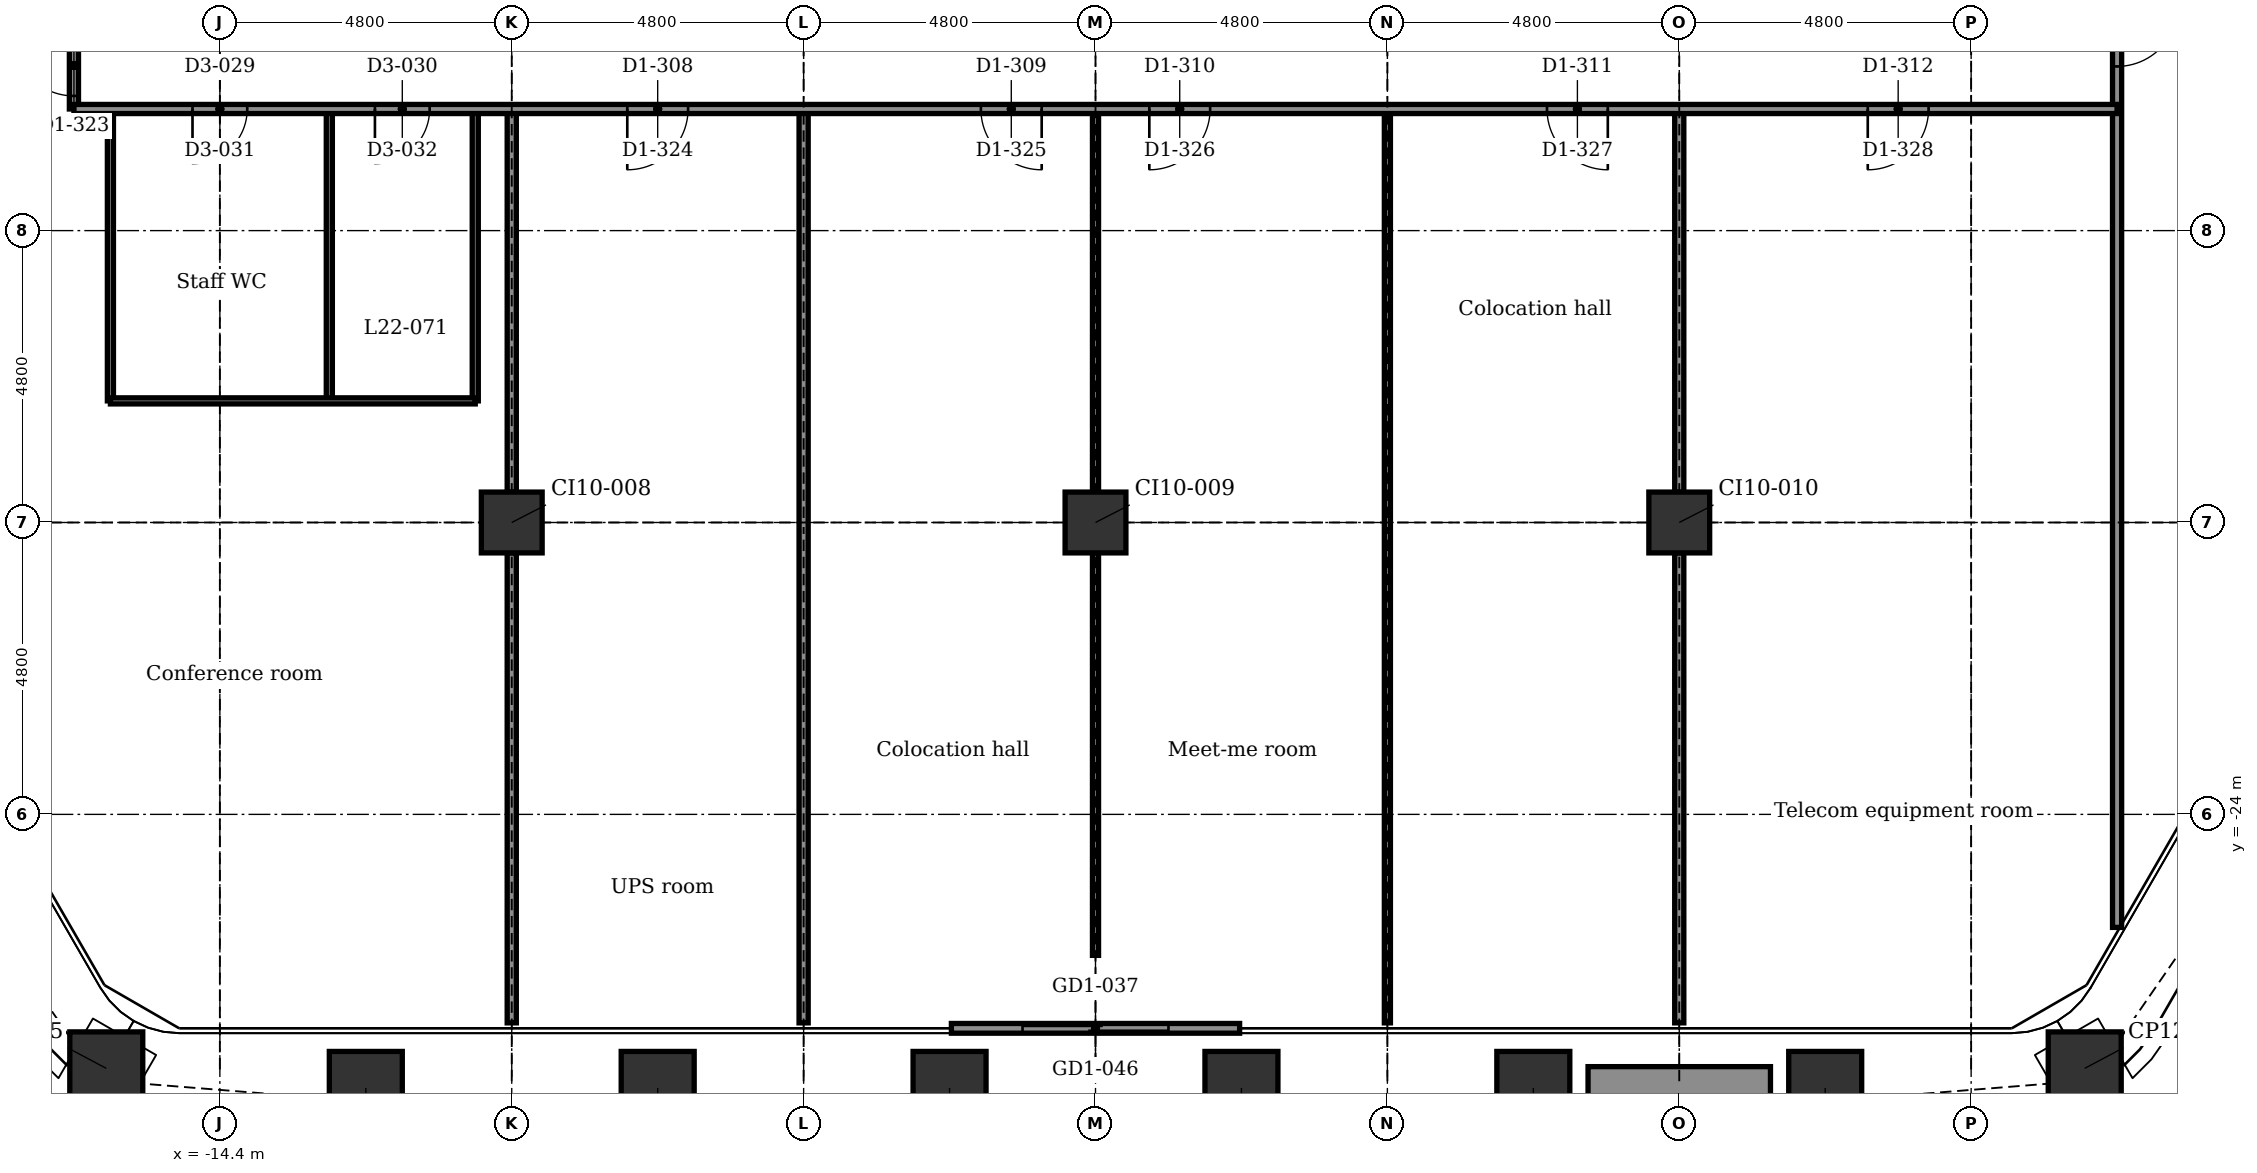
"""IFC4 building model, lengths in metres.
Left out: names, types, materials, properties, quantities, classifications, styles, units other than length and angle.
Written with IfcOpenShell. Run it as: python <this file> out.ifc"""

import sys

from ifc_helpers import new_model, si_unit, direction, frame, frame_2d, origin, origin_2d, place, context, subcontext, project, spatial, rectangle, extrude, element, fill, save


model = new_model("IFC4")
c1 = context("Model", 3, precision=1e-05, world=origin(), true_north=direction((0.0, 1.0)))
c2 = subcontext(c1, "Body", "Model", "MODEL_VIEW")
j1 = project(units=[si_unit("LENGTHUNIT", "METRE"), si_unit("PLANEANGLEUNIT", "RADIAN")], contexts=[c1])
p1 = place(None, origin())
s1 = spatial("IfcSite", under=j1, at=p1, CompositionType="ELEMENT")
p2 = place(p1, origin())
s2 = spatial("IfcBuilding", under=s1, at=p2, CompositionType="ELEMENT")
p3 = place(p2, frame((0.0, 0.0, 113.9)))
s3 = spatial("IfcBuildingStorey", under=s2, at=p3, CompositionType="ELEMENT", Elevation=113.9)
for number, where, z_axis, x_axis in (
    (1, (16.268, -28.177, -0.2), (0.0, 0.0, 1.0), (0.866, 0.5, 0.0)),
    (2, (12.0, -28.499, -0.2), (0.0, 0.0, 1.0), (1.0, 0.0, 0.0)),
    (3, (7.2, -28.499, -0.2), (0.0, 0.0, 1.0), (1.0, 0.0, 0.0)),
    (4, (2.4, -28.499, -0.2), (0.0, 0.0, 1.0), (1.0, 0.0, 0.0)),
    (5, (-2.4, -28.499, -0.2), (0.0, 0.0, 1.0), (1.0, 0.0, 0.0)),
    (6, (-7.2, -28.499, -0.2), (0.0, 0.0, 1.0), (1.0, 0.0, 0.0)),
    (7, (-12.0, -28.499, -0.2), (0.0, 0.0, 1.0), (1.0, 0.0, 0.0)),
    (8, (-16.268, -28.177, -0.2), (0.0, 0.0, 1.0), (0.5, 0.866, 0.0)),
):
    element("IfcColumn", number, at=place(p3, frame(where, z_axis=z_axis, x_axis=x_axis)), inside=s3, PredefinedType="COLUMN", context=c2, shape_type="SweptSolid", body=[
        extrude(rectangle(XDim=1.2, YDim=1.2, at=origin_2d()), origin(), (0.0, 0.0, 1.0), 4.5),
    ])
for number, where, z_axis, x_axis in (
    (9, (-9.6, -19.2, -0.2), (0.0, 0.0, 1.0), (1.0, 0.0, 0.0)),
    (10, (0.0, -19.2, -0.2), (0.0, 0.0, 1.0), (1.0, 0.0, 0.0)),
    (11, (9.6, -19.2, -0.2), (0.0, 0.0, 1.0), (1.0, 0.0, 0.0)),
):
    element("IfcColumn", number, at=place(p3, frame(where, z_axis=z_axis, x_axis=x_axis)), inside=s3, PredefinedType="COLUMN", context=c2, shape_type="SweptSolid", body=[
        extrude(rectangle(XDim=1.0, YDim=1.0, at=origin_2d()), origin(), (0.0, 0.0, 1.0), 4.5),
    ])
p4 = place(p3, frame((2.37, -27.519, 0.0), z_axis=(0.0, 0.0, 1.0), x_axis=(-1.0, 0.0, 0.0)))
e12 = element("IfcWall", 12, at=p4, inside=s3, PredefinedType="PARTITIONING", context=c2, shape_type="SweptSolid", body=[
    extrude(rectangle(XDim=4.74, YDim=0.16, at=frame_2d((2.37, 0.0))), origin(), (0.0, 0.0, 1.0), 4.3),
])
p5 = place(p4, frame((1.17, 0.0, 0.0)))
e13 = element("IfcOpeningElement", 13, at=p5, cuts=e12, PredefinedType="OPENING", context=c2, shape_type="SweptSolid", body=[
    extrude(rectangle(XDim=2.4, YDim=2.4, at=frame_2d((1.2, 1.2))), frame((0.0, 0.09, 0.0), z_axis=(0.0, -1.0, 0.0), x_axis=(1.0, 0.0, 0.0)), (0.0, 0.0, 1.0), 0.18),
])
p6 = place(p3, frame((11.1, -28.448, 0.0), z_axis=(0.0, 0.0, 1.0), x_axis=(-1.0, 0.0, 0.0)))
e14 = element("IfcWall", 14, at=p6, inside=s3, PredefinedType="USERDEFINED", context=c2, shape_type="SweptSolid", body=[
    extrude(rectangle(XDim=3.0, YDim=0.6, at=frame_2d((1.5, 0.0))), origin(), (0.0, 0.0, 1.0), 0.7),
])
p7 = place(p3, frame((16.8, -25.858, 0.0), z_axis=(0.0, 0.0, 1.0), x_axis=(0.0, 1.0, 0.0)))
e15 = element("IfcWall", 15, at=p7, inside=s3, PredefinedType="PARTITIONING", context=c2, shape_type="SweptSolid", body=[
    extrude(rectangle(XDim=21.908, YDim=0.15, at=frame_2d((10.954, 0.0))), origin(), (0.0, 0.0, 1.0), 4.3),
])
p8 = place(p7, frame((14.158, 0.0, 0.0)))
e16 = element("IfcOpeningElement", 16, at=p8, cuts=e15, PredefinedType="OPENING", context=c2, shape_type="SweptSolid", body=[
    extrude(rectangle(XDim=1.0, YDim=2.1, at=frame_2d((0.5, 1.05))), frame((0.0, 0.085, 0.0), z_axis=(0.0, -1.0, 0.0), x_axis=(1.0, 0.0, 0.0)), (0.0, 0.0, 1.0), 0.17),
])
p9 = place(p7, frame((16.759, 0.0, 0.0)))
e17 = element("IfcOpeningElement", 17, at=p9, cuts=e15, PredefinedType="OPENING", context=c2, shape_type="SweptSolid", body=[
    extrude(rectangle(XDim=1.0, YDim=2.1, at=frame_2d((0.5, 1.05))), frame((0.0, 0.085, 0.0), z_axis=(0.0, -1.0, 0.0), x_axis=(1.0, 0.0, 0.0)), (0.0, 0.0, 1.0), 0.17),
])
p10 = place(p7, frame((19.658, 0.0, 0.0)))
e18 = element("IfcOpeningElement", 18, at=p10, cuts=e15, PredefinedType="OPENING", context=c2, shape_type="SweptSolid", body=[
    extrude(rectangle(XDim=1.0, YDim=2.1, at=frame_2d((0.5, 1.05))), frame((0.0, 0.085, 0.0), z_axis=(0.0, -1.0, 0.0), x_axis=(1.0, 0.0, 0.0)), (0.0, 0.0, 1.0), 0.17),
])
p11 = place(p3, frame((9.6, -27.428, 0.0), z_axis=(0.0, 0.0, 1.0), x_axis=(0.0, 1.0, 0.0)))
e19 = element("IfcWall", 19, at=p11, inside=s3, PredefinedType="PARTITIONING", context=c2, shape_type="SweptSolid", body=[
    extrude(rectangle(XDim=7.729, YDim=0.15, at=frame_2d((3.864, 0.0))), origin(), (0.0, 0.0, 1.0), 3.843),
])
p12 = place(p3, frame((9.6, -18.7, 0.0), z_axis=(0.0, 0.0, 1.0), x_axis=(0.0, 1.0, 0.0)))
e20 = element("IfcWall", 20, at=p12, inside=s3, PredefinedType="PARTITIONING", context=c2, shape_type="SweptSolid", body=[
    extrude(rectangle(XDim=6.3, YDim=0.15, at=frame_2d((3.15, 0.0))), origin(), (0.0, 0.0, 1.0), 3.843),
])
p13 = place(p3, frame((4.8, -27.428, 0.0), z_axis=(0.0, 0.0, 1.0), x_axis=(0.0, 1.0, 0.0)))
e21 = element("IfcWall", 21, at=p13, inside=s3, PredefinedType="PARTITIONING", context=c2, shape_type="SweptSolid", body=[
    extrude(rectangle(XDim=15.029, YDim=0.1, at=frame_2d((7.514, 0.0))), origin(), (0.0, 0.0, 1.0), 3.843),
])
p14 = place(p3, frame((0.0, -26.319, 0.0), z_axis=(0.0, 0.0, 1.0), x_axis=(0.0, 1.0, 0.0)))
e22 = element("IfcWall", 22, at=p14, inside=s3, PredefinedType="PARTITIONING", context=c2, shape_type="SweptSolid", body=[
    extrude(rectangle(XDim=6.619, YDim=0.1, at=frame_2d((3.309, 0.0))), origin(), (0.0, 0.0, 1.0), 3.843),
])
p15 = place(p3, frame((0.0, -18.7, 0.0), z_axis=(0.0, 0.0, 1.0), x_axis=(0.0, 1.0, 0.0)))
e23 = element("IfcWall", 23, at=p15, inside=s3, PredefinedType="PARTITIONING", context=c2, shape_type="SweptSolid", body=[
    extrude(rectangle(XDim=6.3, YDim=0.1, at=frame_2d((3.15, 0.0))), origin(), (0.0, 0.0, 1.0), 3.843),
])
p16 = place(p3, frame((-4.8, -27.428, 0.0), z_axis=(0.0, 0.0, 1.0), x_axis=(0.0, 1.0, 0.0)))
e24 = element("IfcWall", 24, at=p16, inside=s3, PredefinedType="PARTITIONING", context=c2, shape_type="SweptSolid", body=[
    extrude(rectangle(XDim=15.029, YDim=0.15, at=frame_2d((7.514, 0.0))), origin(), (0.0, 0.0, 1.0), 3.843),
])
p17 = place(p3, frame((-9.6, -27.428, 0.0), z_axis=(0.0, 0.0, 1.0), x_axis=(0.0, 1.0, 0.0)))
e25 = element("IfcWall", 25, at=p17, inside=s3, PredefinedType="PARTITIONING", context=c2, shape_type="SweptSolid", body=[
    extrude(rectangle(XDim=7.729, YDim=0.15, at=frame_2d((3.864, 0.0))), origin(), (0.0, 0.0, 1.0), 3.843),
])
p18 = place(p3, frame((-9.6, -18.7, 0.0), z_axis=(0.0, 0.0, 1.0), x_axis=(0.0, 1.0, 0.0)))
e26 = element("IfcWall", 26, at=p18, inside=s3, PredefinedType="PARTITIONING", context=c2, shape_type="SweptSolid", body=[
    extrude(rectangle(XDim=6.3, YDim=0.15, at=frame_2d((3.15, 0.0))), origin(), (0.0, 0.0, 1.0), 3.843),
])
for number, where, z_axis, x_axis in (
    (27, (-10.2, -17.2, 0.0), (0.0, 0.0, 1.0), (0.0, 1.0, 0.0)),
    (28, (-12.6, -17.2, 0.0), (0.0, 0.0, 1.0), (0.0, 1.0, 0.0)),
    (29, (-16.2, -17.2, 0.0), (0.0, 0.0, 1.0), (0.0, 1.0, 0.0)),
):
    element("IfcWall", number, at=place(p3, frame(where, z_axis=z_axis, x_axis=x_axis)), inside=s3, PredefinedType="PARTITIONING", context=c2, shape_type="SweptSolid", body=[
        extrude(rectangle(XDim=4.8, YDim=0.1, at=frame_2d((2.4, 0.0))), origin(), (0.0, 0.0, 1.0), 4.3),
    ])
p19 = place(p3, frame((-16.8, -12.4, 0.0), z_axis=(0.0, 0.0, 1.0), x_axis=(0.0, 1.0, 0.0)))
e30 = element("IfcWall", 30, at=p19, inside=s3, PredefinedType="PARTITIONING", context=c2, shape_type="SweptSolid", body=[
    extrude(rectangle(XDim=8.45, YDim=0.15, at=frame_2d((4.225, 0.0))), origin(), (0.0, 0.0, 1.0), 4.3),
])
p20 = place(p19, frame((0.215, 0.0, 0.0)))
e31 = element("IfcOpeningElement", 31, at=p20, cuts=e30, PredefinedType="OPENING", context=c2, shape_type="SweptSolid", body=[
    extrude(rectangle(XDim=1.0, YDim=2.1, at=frame_2d((0.5, 1.05))), frame((0.0, 0.085, 0.0), z_axis=(0.0, -1.0, 0.0), x_axis=(1.0, 0.0, 0.0)), (0.0, 0.0, 1.0), 0.17),
])
p21 = place(p19, frame((5.2, 0.0, 0.0)))
e32 = element("IfcOpeningElement", 32, at=p21, cuts=e30, PredefinedType="OPENING", context=c2, shape_type="SweptSolid", body=[
    extrude(rectangle(XDim=1.0, YDim=2.1, at=frame_2d((0.5, 1.05))), frame((0.0, 0.085, 0.0), z_axis=(0.0, -1.0, 0.0), x_axis=(1.0, 0.0, 0.0)), (0.0, 0.0, 1.0), 0.17),
])
p22 = place(p3, frame((-16.2, -17.2, 0.0), z_axis=(0.0, 0.0, 1.0), x_axis=(1.0, 0.0, 0.0)))
e33 = element("IfcWall", 33, at=p22, inside=s3, PredefinedType="PARTITIONING", context=c2, shape_type="SweptSolid", body=[
    extrude(rectangle(XDim=6.0, YDim=0.1, at=frame_2d((3.0, 0.0))), origin(), (0.0, 0.0, 1.0), 4.3),
])
p23 = place(p3, frame((-16.8, -12.4, 0.0), z_axis=(0.0, 0.0, 1.0), x_axis=(1.0, 0.0, 0.0)))
e34 = element("IfcWall", 34, at=p23, inside=s3, PredefinedType="PARTITIONING", context=c2, shape_type="SweptSolid", body=[
    extrude(rectangle(XDim=33.6, YDim=0.15, at=frame_2d((16.8, 0.0))), origin(), (0.0, 0.0, 1.0), 4.3),
])
p24 = place(p23, frame((9.1, 0.0, 0.0)))
e35 = element("IfcOpeningElement", 35, at=p24, cuts=e34, PredefinedType="OPENING", context=c2, shape_type="SweptSolid", body=[
    extrude(rectangle(XDim=1.0, YDim=2.1, at=frame_2d((0.5, 1.05))), frame((0.0, 0.085, 0.0), z_axis=(0.0, -1.0, 0.0), x_axis=(1.0, 0.0, 0.0)), (0.0, 0.0, 1.0), 0.17),
])
p25 = place(p23, frame((14.915, 0.0, 0.0)))
e36 = element("IfcOpeningElement", 36, at=p25, cuts=e34, PredefinedType="OPENING", context=c2, shape_type="SweptSolid", body=[
    extrude(rectangle(XDim=1.0, YDim=2.1, at=frame_2d((0.5, 1.05))), frame((0.0, 0.085, 0.0), z_axis=(0.0, -1.0, 0.0), x_axis=(1.0, 0.0, 0.0)), (0.0, 0.0, 1.0), 0.17),
])
p26 = place(p23, frame((17.685, 0.0, 0.0)))
e37 = element("IfcOpeningElement", 37, at=p26, cuts=e34, PredefinedType="OPENING", context=c2, shape_type="SweptSolid", body=[
    extrude(rectangle(XDim=1.0, YDim=2.1, at=frame_2d((0.5, 1.05))), frame((0.0, 0.085, 0.0), z_axis=(0.0, -1.0, 0.0), x_axis=(1.0, 0.0, 0.0)), (0.0, 0.0, 1.0), 0.17),
])
p27 = place(p23, frame((24.225, 0.0, 0.0)))
e38 = element("IfcOpeningElement", 38, at=p27, cuts=e34, PredefinedType="OPENING", context=c2, shape_type="SweptSolid", body=[
    extrude(rectangle(XDim=1.0, YDim=2.1, at=frame_2d((0.5, 1.05))), frame((0.0, 0.085, 0.0), z_axis=(0.0, -1.0, 0.0), x_axis=(1.0, 0.0, 0.0)), (0.0, 0.0, 1.0), 0.17),
])
p28 = place(p23, frame((29.5, 0.0, 0.0)))
e39 = element("IfcOpeningElement", 39, at=p28, cuts=e34, PredefinedType="OPENING", context=c2, shape_type="SweptSolid", body=[
    extrude(rectangle(XDim=1.0, YDim=2.1, at=frame_2d((0.5, 1.05))), frame((0.0, 0.085, 0.0), z_axis=(0.0, -1.0, 0.0), x_axis=(1.0, 0.0, 0.0)), (0.0, 0.0, 1.0), 0.17),
])
p29 = place(p23, frame((1.95, 0.0, 0.0)))
e40 = element("IfcOpeningElement", 40, at=p29, cuts=e34, PredefinedType="OPENING", context=c2, shape_type="SweptSolid", body=[
    extrude(rectangle(XDim=0.9, YDim=2.1, at=frame_2d((0.45, 1.05))), frame((0.0, 0.085, 0.0), z_axis=(0.0, -1.0, 0.0), x_axis=(1.0, 0.0, 0.0)), (0.0, 0.0, 1.0), 0.17),
])
p30 = place(p23, frame((4.95, 0.0, 0.0)))
e41 = element("IfcOpeningElement", 41, at=p30, cuts=e34, PredefinedType="OPENING", context=c2, shape_type="SweptSolid", body=[
    extrude(rectangle(XDim=0.9, YDim=2.1, at=frame_2d((0.45, 1.05))), frame((0.0, 0.085, 0.0), z_axis=(0.0, -1.0, 0.0), x_axis=(1.0, 0.0, 0.0)), (0.0, 0.0, 1.0), 0.17),
])
p31 = place(p5, origin())
e42 = element("IfcDoor", 42, at=p31, inside=s3, OperationType="DOUBLE_DOOR_SLIDING", PredefinedType="DOOR", context=c2, shape_type="SweptSolid", body=[
    extrude(rectangle(XDim=2.4, YDim=2.4, at=frame_2d((1.2, 1.2))), frame((0.0, 0.025, 0.0), z_axis=(0.0, -1.0, 0.0), x_axis=(1.0, 0.0, 0.0)), (0.0, 0.0, 1.0), 0.05),
])
fill(e13, e42)
p32 = place(p20, origin())
e43 = element("IfcDoor", 43, at=p32, inside=s3, OperationType="SINGLE_SWING_RIGHT", PredefinedType="DOOR", context=c2, shape_type="SweptSolid", body=[
    extrude(rectangle(XDim=1.0, YDim=2.1, at=frame_2d((0.5, 1.05))), frame((0.0, 0.025, 0.0), z_axis=(0.0, -1.0, 0.0), x_axis=(1.0, 0.0, 0.0)), (0.0, 0.0, 1.0), 0.05),
])
fill(e31, e43)
p33 = place(p24, frame((1.0, 0.0, 0.0), z_axis=(0.0, 0.0, 1.0), x_axis=(-1.0, 0.0, 0.0)))
e44 = element("IfcDoor", 44, at=p33, inside=s3, OperationType="SINGLE_SWING_LEFT", PredefinedType="DOOR", context=c2, shape_type="SweptSolid", body=[
    extrude(rectangle(XDim=1.0, YDim=2.1, at=frame_2d((0.5, 1.05))), frame((0.0, 0.025, 0.0), z_axis=(0.0, -1.0, 0.0), x_axis=(1.0, 0.0, 0.0)), (0.0, 0.0, 1.0), 0.05),
])
fill(e35, e44)
p34 = place(p25, frame((1.0, 0.0, 0.0), z_axis=(0.0, 0.0, 1.0), x_axis=(-1.0, 0.0, 0.0)))
e45 = element("IfcDoor", 45, at=p34, inside=s3, OperationType="SINGLE_SWING_RIGHT", PredefinedType="DOOR", context=c2, shape_type="SweptSolid", body=[
    extrude(rectangle(XDim=1.0, YDim=2.1, at=frame_2d((0.5, 1.05))), frame((0.0, 0.025, 0.0), z_axis=(0.0, -1.0, 0.0), x_axis=(1.0, 0.0, 0.0)), (0.0, 0.0, 1.0), 0.05),
])
fill(e36, e45)
p35 = place(p26, frame((1.0, 0.0, 0.0), z_axis=(0.0, 0.0, 1.0), x_axis=(-1.0, 0.0, 0.0)))
e46 = element("IfcDoor", 46, at=p35, inside=s3, OperationType="SINGLE_SWING_LEFT", PredefinedType="DOOR", context=c2, shape_type="SweptSolid", body=[
    extrude(rectangle(XDim=1.0, YDim=2.1, at=frame_2d((0.5, 1.05))), frame((0.0, 0.025, 0.0), z_axis=(0.0, -1.0, 0.0), x_axis=(1.0, 0.0, 0.0)), (0.0, 0.0, 1.0), 0.05),
])
fill(e37, e46)
p36 = place(p27, frame((1.0, 0.0, 0.0), z_axis=(0.0, 0.0, 1.0), x_axis=(-1.0, 0.0, 0.0)))
e47 = element("IfcDoor", 47, at=p36, inside=s3, OperationType="SINGLE_SWING_RIGHT", PredefinedType="DOOR", context=c2, shape_type="SweptSolid", body=[
    extrude(rectangle(XDim=1.0, YDim=2.1, at=frame_2d((0.5, 1.05))), frame((0.0, 0.025, 0.0), z_axis=(0.0, -1.0, 0.0), x_axis=(1.0, 0.0, 0.0)), (0.0, 0.0, 1.0), 0.05),
])
fill(e38, e47)
p37 = place(p28, frame((1.0, 0.0, 0.0), z_axis=(0.0, 0.0, 1.0), x_axis=(-1.0, 0.0, 0.0)))
e48 = element("IfcDoor", 48, at=p37, inside=s3, OperationType="SINGLE_SWING_LEFT", PredefinedType="DOOR", context=c2, shape_type="SweptSolid", body=[
    extrude(rectangle(XDim=1.0, YDim=2.1, at=frame_2d((0.5, 1.05))), frame((0.0, 0.025, 0.0), z_axis=(0.0, -1.0, 0.0), x_axis=(1.0, 0.0, 0.0)), (0.0, 0.0, 1.0), 0.05),
])
fill(e39, e48)
p38 = place(p8, frame((1.0, 0.0, 0.0), z_axis=(0.0, 0.0, 1.0), x_axis=(-1.0, 0.0, 0.0)))
e49 = element("IfcDoor", 49, at=p38, inside=s3, OperationType="SINGLE_SWING_RIGHT", PredefinedType="DOOR", context=c2, shape_type="SweptSolid", body=[
    extrude(rectangle(XDim=1.0, YDim=2.1, at=frame_2d((0.5, 1.05))), frame((0.0, 0.025, 0.0), z_axis=(0.0, -1.0, 0.0), x_axis=(1.0, 0.0, 0.0)), (0.0, 0.0, 1.0), 0.05),
])
fill(e16, e49)
p39 = place(p29, frame((0.9, 0.0, 0.0), z_axis=(0.0, 0.0, 1.0), x_axis=(-1.0, 0.0, 0.0)))
e50 = element("IfcDoor", 50, at=p39, inside=s3, OperationType="SINGLE_SWING_LEFT", PredefinedType="DOOR", context=c2, shape_type="SweptSolid", body=[
    extrude(rectangle(XDim=0.9, YDim=2.1, at=frame_2d((0.45, 1.05))), frame((0.0, 0.025, 0.0), z_axis=(0.0, -1.0, 0.0), x_axis=(1.0, 0.0, 0.0)), (0.0, 0.0, 1.0), 0.05),
])
fill(e40, e50)
p40 = place(p30, frame((0.9, 0.0, 0.0), z_axis=(0.0, 0.0, 1.0), x_axis=(-1.0, 0.0, 0.0)))
e51 = element("IfcDoor", 51, at=p40, inside=s3, OperationType="SINGLE_SWING_LEFT", PredefinedType="DOOR", context=c2, shape_type="SweptSolid", body=[
    extrude(rectangle(XDim=0.9, YDim=2.1, at=frame_2d((0.45, 1.05))), frame((0.0, 0.025, 0.0), z_axis=(0.0, -1.0, 0.0), x_axis=(1.0, 0.0, 0.0)), (0.0, 0.0, 1.0), 0.05),
])
fill(e41, e51)
save(model, sys.argv[1])
